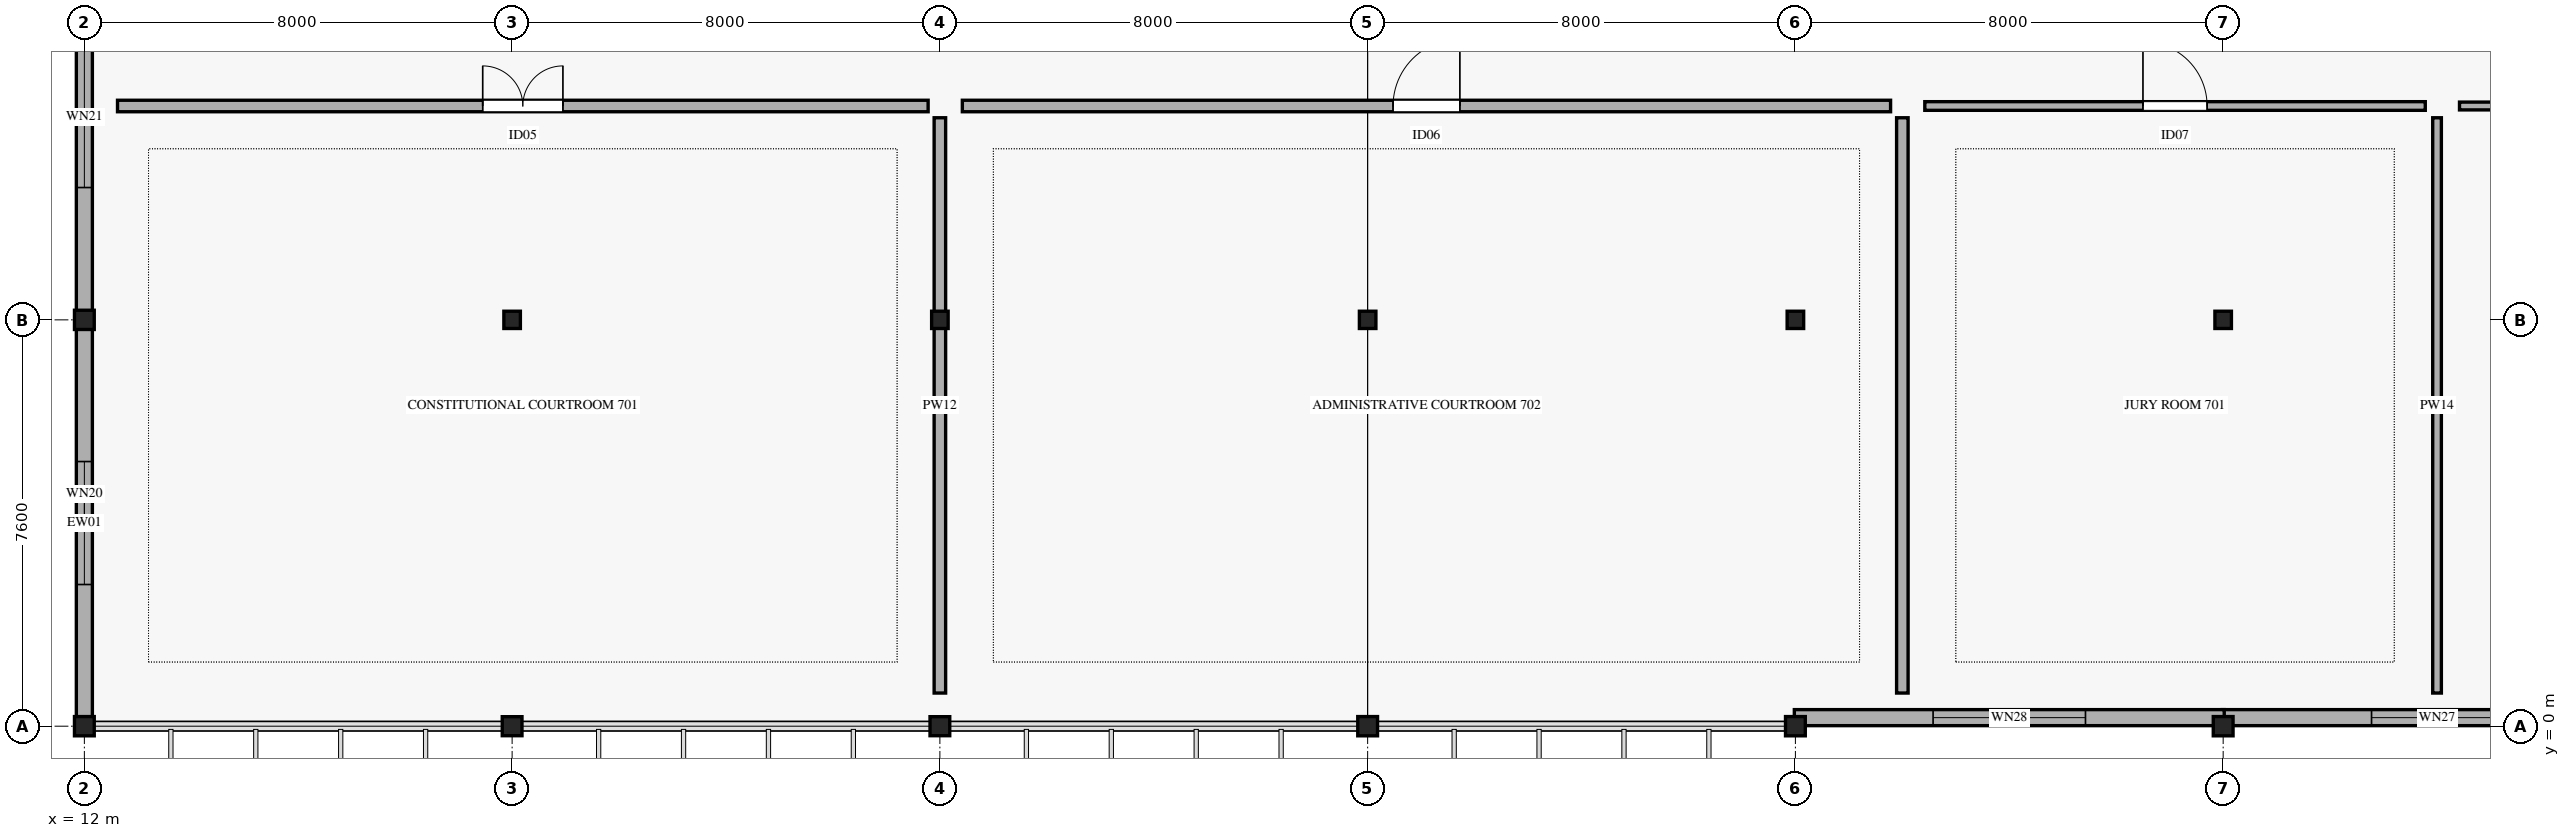
"""IFC4 building model, lengths in metres.
Left out: names, types, materials, properties, quantities, classifications, styles, units other than length and angle.
Written with IfcOpenShell. Run it as: python <this file> out.ifc"""

import sys

from ifc_helpers import new_model, si_unit, direction, frame, frame_2d, origin, origin_2d, place, context, subcontext, project, spatial, rectangle, i_section, extrude, element, fill, save


model = new_model("IFC4")
c1 = context("Model", 3, precision=1e-05, world=origin(), true_north=direction((0.0, 1.0)))
c2 = subcontext(c1, "Body", "Model", "MODEL_VIEW")
j1 = project(units=[si_unit("LENGTHUNIT", "METRE"), si_unit("PLANEANGLEUNIT", "RADIAN")], contexts=[c1])
p1 = place(None, origin())
s1 = spatial("IfcSite", under=j1, at=p1, CompositionType="ELEMENT")
p2 = place(p1, origin())
s2 = spatial("IfcBuilding", under=s1, at=p2, CompositionType="ELEMENT")
p3 = place(p2, frame((0.0, 0.0, 33.6)))
s3 = spatial("IfcBuildingStorey", under=s2, at=p3, CompositionType="ELEMENT", Elevation=33.6)
for number, where, z_axis, x_axis in (
    (1, (12.0, 0.0, 0.0), (0.0, 0.0, 1.0), (1.0, 0.0, 0.0)),
    (2, (12.0, 7.6, 0.0), (0.0, 0.0, 1.0), (1.0, 0.0, 0.0)),
):
    element("IfcColumn", number, at=place(p3, frame(where, z_axis=z_axis, x_axis=x_axis)), inside=s3, PredefinedType="COLUMN", context=c2, shape_type="SweptSolid", body=[
        extrude(i_section(OverallWidth=0.37, OverallDepth=0.36, WebThickness=0.012, FlangeThickness=0.02, FilletRadius=0.015, at=origin_2d()), origin(), (0.0, 0.0, 1.0), 4.0),
    ])
p4 = place(p3, frame((20.0, 0.0, 0.0), z_axis=(0.0, 0.0, 1.0), x_axis=(1.0, 0.0, 0.0)))
e3 = element("IfcColumn", 3, at=p4, inside=s3, PredefinedType="COLUMN", context=c2, shape_type="SweptSolid", body=[
    extrude(i_section(OverallWidth=0.369, OverallDepth=0.356, WebThickness=0.011, FlangeThickness=0.018, FilletRadius=0.015, at=origin_2d()), origin(), (0.0, 0.0, 1.0), 4.0),
])
p5 = place(p3, frame((20.0, 7.6, 0.0), z_axis=(0.0, 0.0, 1.0), x_axis=(1.0, 0.0, 0.0)))
e4 = element("IfcColumn", 4, at=p5, inside=s3, PredefinedType="COLUMN", context=c2, shape_type="SweptSolid", body=[
    extrude(i_section(OverallWidth=0.309, OverallDepth=0.323, WebThickness=0.014, FlangeThickness=0.023, FilletRadius=0.015, at=origin_2d()), origin(), (0.0, 0.0, 1.0), 4.0),
])
p6 = place(p3, frame((28.0, 0.0, 0.0), z_axis=(0.0, 0.0, 1.0), x_axis=(1.0, 0.0, 0.0)))
e5 = element("IfcColumn", 5, at=p6, inside=s3, PredefinedType="COLUMN", context=c2, shape_type="SweptSolid", body=[
    extrude(i_section(OverallWidth=0.369, OverallDepth=0.356, WebThickness=0.011, FlangeThickness=0.018, FilletRadius=0.015, at=origin_2d()), origin(), (0.0, 0.0, 1.0), 4.0),
])
p7 = place(p3, frame((28.0, 7.6, 0.0), z_axis=(0.0, 0.0, 1.0), x_axis=(1.0, 0.0, 0.0)))
e6 = element("IfcColumn", 6, at=p7, inside=s3, PredefinedType="COLUMN", context=c2, shape_type="SweptSolid", body=[
    extrude(i_section(OverallWidth=0.309, OverallDepth=0.323, WebThickness=0.014, FlangeThickness=0.023, FilletRadius=0.015, at=origin_2d()), origin(), (0.0, 0.0, 1.0), 4.0),
])
p8 = place(p3, frame((36.0, 0.0, 0.0), z_axis=(0.0, 0.0, 1.0), x_axis=(1.0, 0.0, 0.0)))
e7 = element("IfcColumn", 7, at=p8, inside=s3, PredefinedType="COLUMN", context=c2, shape_type="SweptSolid", body=[
    extrude(i_section(OverallWidth=0.37, OverallDepth=0.36, WebThickness=0.012, FlangeThickness=0.02, FilletRadius=0.015, at=origin_2d()), origin(), (0.0, 0.0, 1.0), 4.0),
])
p9 = place(p3, frame((36.0, 7.6, 0.0), z_axis=(0.0, 0.0, 1.0), x_axis=(1.0, 0.0, 0.0)))
e8 = element("IfcColumn", 8, at=p9, inside=s3, PredefinedType="COLUMN", context=c2, shape_type="SweptSolid", body=[
    extrude(i_section(OverallWidth=0.309, OverallDepth=0.323, WebThickness=0.014, FlangeThickness=0.023, FilletRadius=0.015, at=origin_2d()), origin(), (0.0, 0.0, 1.0), 4.0),
])
p10 = place(p3, frame((44.0, 0.0, 0.0), z_axis=(0.0, 0.0, 1.0), x_axis=(1.0, 0.0, 0.0)))
e9 = element("IfcColumn", 9, at=p10, inside=s3, PredefinedType="COLUMN", context=c2, shape_type="SweptSolid", body=[
    extrude(i_section(OverallWidth=0.37, OverallDepth=0.36, WebThickness=0.012, FlangeThickness=0.02, FilletRadius=0.015, at=origin_2d()), origin(), (0.0, 0.0, 1.0), 4.0),
])
p11 = place(p3, frame((44.0, 7.6, 0.0), z_axis=(0.0, 0.0, 1.0), x_axis=(1.0, 0.0, 0.0)))
e10 = element("IfcColumn", 10, at=p11, inside=s3, PredefinedType="COLUMN", context=c2, shape_type="SweptSolid", body=[
    extrude(i_section(OverallWidth=0.309, OverallDepth=0.323, WebThickness=0.014, FlangeThickness=0.023, FilletRadius=0.015, at=origin_2d()), origin(), (0.0, 0.0, 1.0), 4.0),
])
p12 = place(p3, frame((52.0, 0.0, 0.0), z_axis=(0.0, 0.0, 1.0), x_axis=(1.0, 0.0, 0.0)))
e11 = element("IfcColumn", 11, at=p12, inside=s3, PredefinedType="COLUMN", context=c2, shape_type="SweptSolid", body=[
    extrude(i_section(OverallWidth=0.37, OverallDepth=0.36, WebThickness=0.012, FlangeThickness=0.02, FilletRadius=0.015, at=origin_2d()), origin(), (0.0, 0.0, 1.0), 4.0),
])
p13 = place(p3, frame((52.0, 7.6, 0.0), z_axis=(0.0, 0.0, 1.0), x_axis=(1.0, 0.0, 0.0)))
e12 = element("IfcColumn", 12, at=p13, inside=s3, PredefinedType="COLUMN", context=c2, shape_type="SweptSolid", body=[
    extrude(i_section(OverallWidth=0.309, OverallDepth=0.323, WebThickness=0.014, FlangeThickness=0.023, FilletRadius=0.015, at=origin_2d()), origin(), (0.0, 0.0, 1.0), 4.0),
])
p14 = place(p3, frame((12.0, -0.02, 0.0), z_axis=(0.0, 0.0, 1.0), x_axis=(0.0, 1.0, 0.0)))
e13 = element("IfcWall", 13, at=p14, inside=s3, PredefinedType="STANDARD", context=c2, shape_type="SweptSolid", body=[
    extrude(rectangle(XDim=7.64, YDim=0.3, at=frame_2d((3.82, 0.0))), origin(), (0.0, 0.0, 1.0), 3.06),
])
p15 = place(p14, frame((2.67, 0.0, 0.75)))
e14 = element("IfcOpeningElement", 14, at=p15, cuts=e13, PredefinedType="OPENING", context=c2, shape_type="SweptSolid", body=[
    extrude(rectangle(XDim=2.3, YDim=1.8, at=frame_2d((1.15, 0.9))), frame((0.0, 0.16, 0.0), z_axis=(0.0, -1.0, 0.0), x_axis=(1.0, 0.0, 0.0)), (0.0, 0.0, 1.0), 0.32),
])
p16 = place(p3, frame((12.0, 7.58, 0.0), z_axis=(0.0, 0.0, 1.0), x_axis=(0.0, 1.0, 0.0)))
e15 = element("IfcWall", 15, at=p16, inside=s3, PredefinedType="STANDARD", context=c2, shape_type="SweptSolid", body=[
    extrude(rectangle(XDim=7.64, YDim=0.3, at=frame_2d((3.82, 0.0))), origin(), (0.0, 0.0, 1.0), 3.06),
])
p17 = place(p16, frame((2.495, 0.0, 0.75)))
e16 = element("IfcOpeningElement", 16, at=p17, cuts=e15, PredefinedType="OPENING", context=c2, shape_type="SweptSolid", body=[
    extrude(rectangle(XDim=2.65, YDim=1.8, at=frame_2d((1.325, 0.9))), frame((0.0, 0.16, 0.0), z_axis=(0.0, -1.0, 0.0), x_axis=(1.0, 0.0, 0.0)), (0.0, 0.0, 1.0), 0.32),
])
p18 = place(p3, frame((60.02, 0.16, 0.0), z_axis=(0.0, 0.0, 1.0), x_axis=(-1.0, 0.0, 0.0)))
e17 = element("IfcWall", 17, at=p18, inside=s3, PredefinedType="STANDARD", context=c2, shape_type="SweptSolid", body=[
    extrude(rectangle(XDim=8.04, YDim=0.3, at=frame_2d((4.02, 0.0))), origin(), (0.0, 0.0, 1.0), 3.06),
])
p19 = place(p18, frame((2.795, 0.0, 0.75)))
e18 = element("IfcOpeningElement", 18, at=p19, cuts=e17, PredefinedType="OPENING", context=c2, shape_type="SweptSolid", body=[
    extrude(rectangle(XDim=2.45, YDim=1.55, at=frame_2d((1.225, 0.775))), frame((0.0, 0.16, 0.0), z_axis=(0.0, -1.0, 0.0), x_axis=(1.0, 0.0, 0.0)), (0.0, 0.0, 1.0), 0.32),
])
p20 = place(p3, frame((52.02, 0.16, 0.0), z_axis=(0.0, 0.0, 1.0), x_axis=(-1.0, 0.0, 0.0)))
e19 = element("IfcWall", 19, at=p20, inside=s3, PredefinedType="STANDARD", context=c2, shape_type="SweptSolid", body=[
    extrude(rectangle(XDim=8.04, YDim=0.3, at=frame_2d((4.02, 0.0))), origin(), (0.0, 0.0, 1.0), 3.06),
])
p21 = place(p20, frame((2.595, 0.0, 0.75)))
e20 = element("IfcOpeningElement", 20, at=p21, cuts=e19, PredefinedType="OPENING", context=c2, shape_type="SweptSolid", body=[
    extrude(rectangle(XDim=2.85, YDim=1.55, at=frame_2d((1.425, 0.775))), frame((0.0, 0.16, 0.0), z_axis=(0.0, -1.0, 0.0), x_axis=(1.0, 0.0, 0.0)), (0.0, 0.0, 1.0), 0.32),
])
p22 = place(p3, frame((12.62, 11.6, 0.0), z_axis=(0.0, 0.0, 1.0), x_axis=(1.0, 0.0, 0.0)))
e21 = element("IfcWall", 21, at=p22, inside=s3, PredefinedType="PARTITIONING", context=c2, shape_type="SweptSolid", body=[
    extrude(rectangle(XDim=15.16, YDim=0.215, at=frame_2d((7.58, 0.0))), origin(), (0.0, 0.0, 1.0), 2.85),
])
p23 = place(p22, frame((6.83, 0.0, 0.0)))
e22 = element("IfcOpeningElement", 22, at=p23, cuts=e21, PredefinedType="OPENING", context=c2, shape_type="SweptSolid", body=[
    extrude(rectangle(XDim=1.5, YDim=2.2, at=frame_2d((0.75, 1.1))), frame((0.0, 0.117, 0.0), z_axis=(0.0, -1.0, 0.0), x_axis=(1.0, 0.0, 0.0)), (0.0, 0.0, 1.0), 0.235),
])
p24 = place(p3, frame((28.0, 0.62, 0.0), z_axis=(0.0, 0.0, 1.0), x_axis=(0.0, 1.0, 0.0)))
e23 = element("IfcWall", 23, at=p24, inside=s3, PredefinedType="PARTITIONING", context=c2, shape_type="SweptSolid", body=[
    extrude(rectangle(XDim=10.76, YDim=0.215, at=frame_2d((5.38, 0.0))), origin(), (0.0, 0.0, 1.0), 2.85),
])
p25 = place(p3, frame((28.42, 11.6, 0.0), z_axis=(0.0, 0.0, 1.0), x_axis=(1.0, 0.0, 0.0)))
e24 = element("IfcWall", 24, at=p25, inside=s3, PredefinedType="PARTITIONING", context=c2, shape_type="SweptSolid", body=[
    extrude(rectangle(XDim=17.36, YDim=0.215, at=frame_2d((8.68, 0.0))), origin(), (0.0, 0.0, 1.0), 2.85),
])
p26 = place(p25, frame((8.055, 0.0, 0.0)))
e25 = element("IfcOpeningElement", 25, at=p26, cuts=e24, PredefinedType="OPENING", context=c2, shape_type="SweptSolid", body=[
    extrude(rectangle(XDim=1.25, YDim=2.2, at=frame_2d((0.625, 1.1))), frame((0.0, 0.117, 0.0), z_axis=(0.0, -1.0, 0.0), x_axis=(1.0, 0.0, 0.0)), (0.0, 0.0, 1.0), 0.235),
])
p27 = place(p3, frame((46.0, 0.62, 0.0), z_axis=(0.0, 0.0, 1.0), x_axis=(0.0, 1.0, 0.0)))
e26 = element("IfcWall", 26, at=p27, inside=s3, PredefinedType="PARTITIONING", context=c2, shape_type="SweptSolid", body=[
    extrude(rectangle(XDim=10.76, YDim=0.215, at=frame_2d((5.38, 0.0))), origin(), (0.0, 0.0, 1.0), 2.85),
])
p28 = place(p3, frame((46.42, 11.6, 0.0), z_axis=(0.0, 0.0, 1.0), x_axis=(1.0, 0.0, 0.0)))
e27 = element("IfcWall", 27, at=p28, inside=s3, PredefinedType="PARTITIONING", context=c2, shape_type="SweptSolid", body=[
    extrude(rectangle(XDim=9.36, YDim=0.162, at=frame_2d((4.68, 0.0))), origin(), (0.0, 0.0, 1.0), 2.85),
])
p29 = place(p28, frame((4.08, 0.0, 0.0)))
e28 = element("IfcOpeningElement", 28, at=p29, cuts=e27, PredefinedType="OPENING", context=c2, shape_type="SweptSolid", body=[
    extrude(rectangle(XDim=1.2, YDim=2.2, at=frame_2d((0.6, 1.1))), frame((0.0, 0.091, 0.0), z_axis=(0.0, -1.0, 0.0), x_axis=(1.0, 0.0, 0.0)), (0.0, 0.0, 1.0), 0.182),
])
p30 = place(p3, frame((56.0, 0.62, 0.0), z_axis=(0.0, 0.0, 1.0), x_axis=(0.0, 1.0, 0.0)))
e29 = element("IfcWall", 29, at=p30, inside=s3, PredefinedType="PARTITIONING", context=c2, shape_type="SweptSolid", body=[
    extrude(rectangle(XDim=10.76, YDim=0.162, at=frame_2d((5.38, 0.0))), origin(), (0.0, 0.0, 1.0), 2.85),
])
p31 = place(p3, frame((56.42, 11.6, 0.0), z_axis=(0.0, 0.0, 1.0), x_axis=(1.0, 0.0, 0.0)))
e30 = element("IfcWall", 30, at=p31, inside=s3, PredefinedType="PARTITIONING", context=c2, shape_type="SweptSolid", body=[
    extrude(rectangle(XDim=9.36, YDim=0.146, at=frame_2d((4.68, 0.0))), origin(), (0.0, 0.0, 1.0), 2.85),
])
p32 = place(p31, frame((4.105, 0.0, 0.0)))
e31 = element("IfcOpeningElement", 31, at=p32, cuts=e30, PredefinedType="OPENING", context=c2, shape_type="SweptSolid", body=[
    extrude(rectangle(XDim=1.15, YDim=2.2, at=frame_2d((0.575, 1.1))), frame((0.0, 0.083, 0.0), z_axis=(0.0, -1.0, 0.0), x_axis=(1.0, 0.0, 0.0)), (0.0, 0.0, 1.0), 0.166),
])
p33 = place(p15, origin())
e32 = element("IfcWindow", 32, at=p33, inside=s3, PartitioningType="SINGLE_PANEL", PredefinedType="WINDOW", context=c2, shape_type="SweptSolid", body=[
    extrude(rectangle(XDim=2.3, YDim=1.8, at=frame_2d((1.15, 0.9))), frame((0.0, 0.03, 0.0), z_axis=(0.0, -1.0, 0.0), x_axis=(1.0, 0.0, 0.0)), (0.0, 0.0, 1.0), 0.06),
])
fill(e14, e32)
p34 = place(p17, origin())
e33 = element("IfcWindow", 33, at=p34, inside=s3, PartitioningType="SINGLE_PANEL", PredefinedType="WINDOW", context=c2, shape_type="SweptSolid", body=[
    extrude(rectangle(XDim=2.65, YDim=1.8, at=frame_2d((1.325, 0.9))), frame((0.0, 0.03, 0.0), z_axis=(0.0, -1.0, 0.0), x_axis=(1.0, 0.0, 0.0)), (0.0, 0.0, 1.0), 0.06),
])
fill(e16, e33)
p35 = place(p19, origin())
e34 = element("IfcWindow", 34, at=p35, inside=s3, PartitioningType="SINGLE_PANEL", PredefinedType="WINDOW", context=c2, shape_type="SweptSolid", body=[
    extrude(rectangle(XDim=2.45, YDim=1.55, at=frame_2d((1.225, 0.775))), frame((0.0, 0.03, 0.0), z_axis=(0.0, -1.0, 0.0), x_axis=(1.0, 0.0, 0.0)), (0.0, 0.0, 1.0), 0.06),
])
fill(e18, e34)
p36 = place(p21, origin())
e35 = element("IfcWindow", 35, at=p36, inside=s3, PartitioningType="SINGLE_PANEL", PredefinedType="WINDOW", context=c2, shape_type="SweptSolid", body=[
    extrude(rectangle(XDim=2.85, YDim=1.55, at=frame_2d((1.425, 0.775))), frame((0.0, 0.03, 0.0), z_axis=(0.0, -1.0, 0.0), x_axis=(1.0, 0.0, 0.0)), (0.0, 0.0, 1.0), 0.06),
])
fill(e20, e35)
p37 = place(p23, origin())
e36 = element("IfcDoor", 36, at=p37, inside=s3, OperationType="DOUBLE_DOOR_SINGLE_SWING", PredefinedType="DOOR", context=c2, shape_type="SweptSolid", body=[
    extrude(rectangle(XDim=1.5, YDim=2.2, at=frame_2d((0.75, 1.1))), frame((0.0, 0.025, 0.0), z_axis=(0.0, -1.0, 0.0), x_axis=(1.0, 0.0, 0.0)), (0.0, 0.0, 1.0), 0.05),
])
fill(e22, e36)
p38 = place(p26, origin())
e37 = element("IfcDoor", 37, at=p38, inside=s3, OperationType="SINGLE_SWING_RIGHT", PredefinedType="DOOR", context=c2, shape_type="SweptSolid", body=[
    extrude(rectangle(XDim=1.25, YDim=2.2, at=frame_2d((0.625, 1.1))), frame((0.0, 0.025, 0.0), z_axis=(0.0, -1.0, 0.0), x_axis=(1.0, 0.0, 0.0)), (0.0, 0.0, 1.0), 0.05),
])
fill(e25, e37)
p39 = place(p29, origin())
e38 = element("IfcDoor", 38, at=p39, inside=s3, OperationType="SINGLE_SWING_LEFT", PredefinedType="DOOR", context=c2, shape_type="SweptSolid", body=[
    extrude(rectangle(XDim=1.2, YDim=2.2, at=frame_2d((0.6, 1.1))), frame((0.0, 0.025, 0.0), z_axis=(0.0, -1.0, 0.0), x_axis=(1.0, 0.0, 0.0)), (0.0, 0.0, 1.0), 0.05),
])
fill(e28, e38)
save(model, sys.argv[1])
